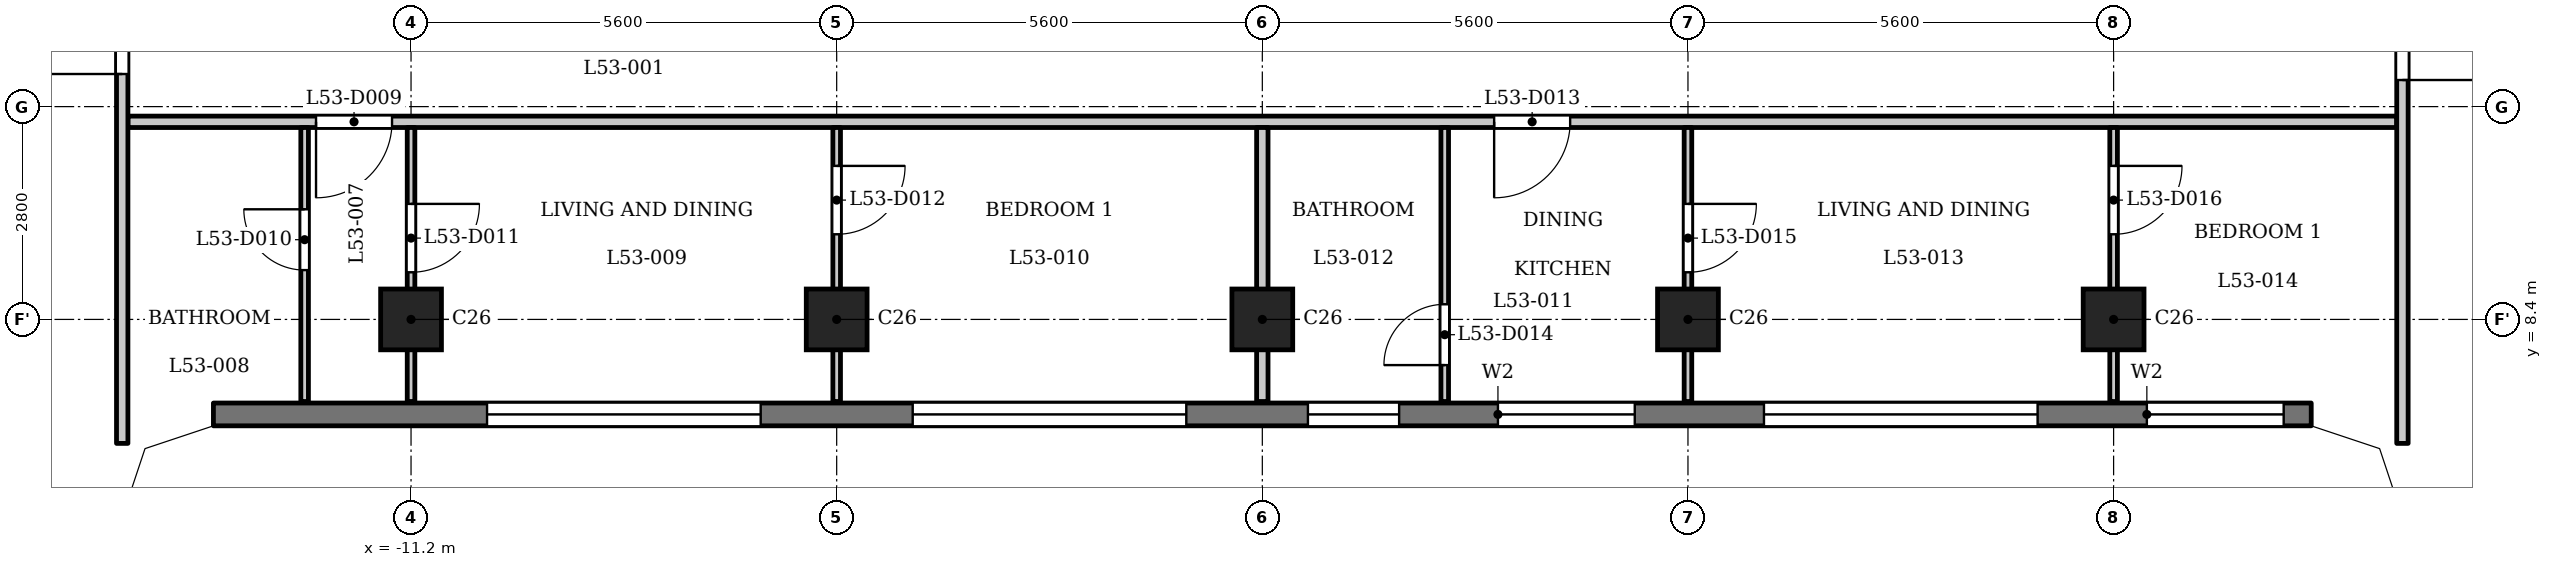
"""IFC4 building model, lengths in metres.
Left out: names, types, materials, properties, quantities, classifications, styles, units other than length and angle.
Written with IfcOpenShell. Run it as: python <this file> out.ifc"""

import sys

from ifc_helpers import new_model, si_unit, direction, frame, frame_2d, origin, origin_2d, place, context, subcontext, project, spatial, polyline, rectangle, outline, extrude, element, fill, save


model = new_model("IFC4")
c1 = context("Model", 3, precision=1e-05, world=origin(), true_north=direction((0.0, 1.0)))
c2 = subcontext(c1, "Body", "Model", "MODEL_VIEW")
j1 = project(units=[si_unit("LENGTHUNIT", "METRE"), si_unit("PLANEANGLEUNIT", "RADIAN")], contexts=[c1])
p1 = place(None, origin())
s1 = spatial("IfcSite", under=j1, at=p1, CompositionType="ELEMENT")
p2 = place(p1, origin())
s2 = spatial("IfcBuilding", under=s1, at=p2, CompositionType="ELEMENT")
p3 = place(p2, frame((0.0, 0.0, 206.4)))
s3 = spatial("IfcBuildingStorey", under=s2, at=p3, CompositionType="ELEMENT", Elevation=206.4)
for number, where, z_axis, x_axis in (
    (1, (-11.2, 8.4, 0.0), (0.0, 0.0, 1.0), (1.0, 0.0, 0.0)),
    (2, (-5.6, 8.4, 0.0), (0.0, 0.0, 1.0), (1.0, 0.0, 0.0)),
    (3, (0.0, 8.4, 0.0), (0.0, 0.0, 1.0), (1.0, 0.0, 0.0)),
    (4, (5.6, 8.4, 0.0), (0.0, 0.0, 1.0), (1.0, 0.0, 0.0)),
    (5, (11.2, 8.4, 0.0), (0.0, 0.0, 1.0), (1.0, 0.0, 0.0)),
):
    element("IfcColumn", number, at=place(p3, frame(where, z_axis=z_axis, x_axis=x_axis)), inside=s3, PredefinedType="COLUMN", context=c2, shape_type="SweptSolid", body=[
        extrude(rectangle(XDim=0.8, YDim=0.8, at=origin_2d()), origin(), (0.0, 0.0, 1.0), 3.5),
    ])
p4 = place(p3, frame((-13.8, 7.15, 0.0), z_axis=(0.0, 0.0, 1.0), x_axis=(1.0, 0.0, 0.0)))
e6 = element("IfcWall", 6, at=p4, inside=s3, PredefinedType="SOLIDWALL", context=c2, shape_type="SweptSolid", body=[
    extrude(rectangle(XDim=27.6, YDim=0.3, at=frame_2d((13.8, 0.0))), origin(), (0.0, 0.0, 1.0), 3.2),
])
p5 = place(p4, frame((3.6, 0.0, 1.2)))
e7 = element("IfcOpeningElement", 7, at=p5, cuts=e6, PredefinedType="OPENING", context=c2, shape_type="SweptSolid", body=[
    extrude(rectangle(XDim=3.6, YDim=0.95, at=frame_2d((1.8, 0.475))), frame((0.0, 0.16, 0.0), z_axis=(0.0, -1.0, 0.0), x_axis=(1.0, 0.0, 0.0)), (0.0, 0.0, 1.0), 0.32),
])
p6 = place(p4, frame((9.2, 0.0, 1.2)))
e8 = element("IfcOpeningElement", 8, at=p6, cuts=e6, PredefinedType="OPENING", context=c2, shape_type="SweptSolid", body=[
    extrude(rectangle(XDim=3.6, YDim=0.95, at=frame_2d((1.8, 0.475))), frame((0.0, 0.16, 0.0), z_axis=(0.0, -1.0, 0.0), x_axis=(1.0, 0.0, 0.0)), (0.0, 0.0, 1.0), 0.32),
])
p7 = place(p4, frame((14.4, 0.0, 0.6)))
e9 = element("IfcOpeningElement", 9, at=p7, cuts=e6, PredefinedType="OPENING", context=c2, shape_type="SweptSolid", body=[
    extrude(rectangle(XDim=1.2, YDim=1.55, at=frame_2d((0.6, 0.775))), frame((0.0, 0.16, 0.0), z_axis=(0.0, -1.0, 0.0), x_axis=(1.0, 0.0, 0.0)), (0.0, 0.0, 1.0), 0.32),
])
p8 = place(p4, frame((16.9, 0.0, 0.9)))
e10 = element("IfcOpeningElement", 10, at=p8, cuts=e6, PredefinedType="OPENING", context=c2, shape_type="SweptSolid", body=[
    extrude(rectangle(XDim=1.8, YDim=1.25, at=frame_2d((0.9, 0.625))), frame((0.0, 0.16, 0.0), z_axis=(0.0, -1.0, 0.0), x_axis=(1.0, 0.0, 0.0)), (0.0, 0.0, 1.0), 0.32),
])
p9 = place(p4, frame((20.4, 0.0, 1.2)))
e11 = element("IfcOpeningElement", 11, at=p9, cuts=e6, PredefinedType="OPENING", context=c2, shape_type="SweptSolid", body=[
    extrude(rectangle(XDim=3.6, YDim=0.95, at=frame_2d((1.8, 0.475))), frame((0.0, 0.16, 0.0), z_axis=(0.0, -1.0, 0.0), x_axis=(1.0, 0.0, 0.0)), (0.0, 0.0, 1.0), 0.32),
])
p10 = place(p4, frame((25.438, 0.0, 0.9)))
e12 = element("IfcOpeningElement", 12, at=p10, cuts=e6, PredefinedType="OPENING", context=c2, shape_type="SweptSolid", body=[
    extrude(rectangle(XDim=1.8, YDim=1.25, at=frame_2d((0.9, 0.625))), frame((0.0, 0.16, 0.0), z_axis=(0.0, -1.0, 0.0), x_axis=(1.0, 0.0, 0.0)), (0.0, 0.0, 1.0), 0.32),
])
p11 = place(p3, frame((-14.925, 11.0, 0.0), z_axis=(0.0, 0.0, 1.0), x_axis=(1.0, 0.0, 0.0)))
e13 = element("IfcWall", 13, at=p11, inside=s3, PredefinedType="PARTITIONING", context=c2, shape_type="SweptSolid", body=[
    extrude(rectangle(XDim=29.85, YDim=0.15, at=frame_2d((14.925, 0.0))), origin(), (0.0, 0.0, 1.0), 3.2),
])
p12 = place(p11, frame((2.475, 0.0, 0.0)))
e14 = element("IfcOpeningElement", 14, at=p12, cuts=e13, PredefinedType="OPENING", context=c2, shape_type="SweptSolid", body=[
    extrude(rectangle(XDim=1.0, YDim=2.1, at=frame_2d((0.5, 1.05))), frame((0.0, 0.085, 0.0), z_axis=(0.0, -1.0, 0.0), x_axis=(1.0, 0.0, 0.0)), (0.0, 0.0, 1.0), 0.17),
])
p13 = place(p11, frame((17.975, 0.0, 0.0)))
e15 = element("IfcOpeningElement", 15, at=p13, cuts=e13, PredefinedType="OPENING", context=c2, shape_type="SweptSolid", body=[
    extrude(rectangle(XDim=1.0, YDim=2.1, at=frame_2d((0.5, 1.05))), frame((0.0, 0.085, 0.0), z_axis=(0.0, -1.0, 0.0), x_axis=(1.0, 0.0, 0.0)), (0.0, 0.0, 1.0), 0.17),
])
p14 = place(p3, frame((-15.0, 6.769, 0.0), z_axis=(0.0, 0.0, 1.0), x_axis=(0.0, 1.0, 0.0)))
e16 = element("IfcWall", 16, at=p14, inside=s3, PredefinedType="PARTITIONING", context=c2, shape_type="SweptSolid", body=[
    extrude(rectangle(XDim=6.356, YDim=0.15, at=frame_2d((3.178, 0.0))), origin(), (0.0, 0.0, 1.0), 3.2),
])
p15 = place(p14, frame((4.86, 0.0, 0.0)))
e17 = element("IfcOpeningElement", 17, at=p15, cuts=e16, PredefinedType="OPENING", context=c2, shape_type="SweptSolid", body=[
    extrude(rectangle(XDim=1.0, YDim=2.1, at=frame_2d((0.5, 1.05))), frame((0.0, 0.085, 0.0), z_axis=(0.0, -1.0, 0.0), x_axis=(1.0, 0.0, 0.0)), (0.0, 0.0, 1.0), 0.17),
])
p16 = place(p3, frame((-12.6, 7.32, 0.0), z_axis=(0.0, 0.0, 1.0), x_axis=(0.0, 1.0, 0.0)))
e18 = element("IfcWall", 18, at=p16, inside=s3, PredefinedType="PARTITIONING", context=c2, shape_type="SweptSolid", body=[
    extrude(rectangle(XDim=3.605, YDim=0.1, at=frame_2d((1.802, 0.0))), origin(), (0.0, 0.0, 1.0), 3.2),
])
p17 = place(p16, frame((1.729, 0.0, 0.0)))
e19 = element("IfcOpeningElement", 19, at=p17, cuts=e18, PredefinedType="OPENING", context=c2, shape_type="SweptSolid", body=[
    extrude(rectangle(XDim=0.8, YDim=2.1, at=frame_2d((0.4, 1.05))), frame((0.0, 0.06, 0.0), z_axis=(0.0, -1.0, 0.0), x_axis=(1.0, 0.0, 0.0)), (0.0, 0.0, 1.0), 0.12),
])
p18 = place(p3, frame((-11.2, 7.32, 0.0), z_axis=(0.0, 0.0, 1.0), x_axis=(0.0, 1.0, 0.0)))
e20 = element("IfcWall", 20, at=p18, inside=s3, PredefinedType="PARTITIONING", context=c2, shape_type="SweptSolid", body=[
    extrude(rectangle(XDim=3.605, YDim=0.1, at=frame_2d((1.802, 0.0))), origin(), (0.0, 0.0, 1.0), 3.2),
])
p19 = place(p18, frame((1.7, 0.0, 0.0)))
e21 = element("IfcOpeningElement", 21, at=p19, cuts=e20, PredefinedType="OPENING", context=c2, shape_type="SweptSolid", body=[
    extrude(rectangle(XDim=0.9, YDim=2.1, at=frame_2d((0.45, 1.05))), frame((0.0, 0.06, 0.0), z_axis=(0.0, -1.0, 0.0), x_axis=(1.0, 0.0, 0.0)), (0.0, 0.0, 1.0), 0.12),
])
p20 = place(p3, frame((-5.6, 7.32, 0.0), z_axis=(0.0, 0.0, 1.0), x_axis=(0.0, 1.0, 0.0)))
e22 = element("IfcWall", 22, at=p20, inside=s3, PredefinedType="PARTITIONING", context=c2, shape_type="SweptSolid", body=[
    extrude(rectangle(XDim=3.605, YDim=0.1, at=frame_2d((1.802, 0.0))), origin(), (0.0, 0.0, 1.0), 3.2),
])
p21 = place(p20, frame((2.2, 0.0, 0.0)))
e23 = element("IfcOpeningElement", 23, at=p21, cuts=e22, PredefinedType="OPENING", context=c2, shape_type="SweptSolid", body=[
    extrude(rectangle(XDim=0.9, YDim=2.1, at=frame_2d((0.45, 1.05))), frame((0.0, 0.06, 0.0), z_axis=(0.0, -1.0, 0.0), x_axis=(1.0, 0.0, 0.0)), (0.0, 0.0, 1.0), 0.12),
])
p22 = place(p3, frame((0.0, 7.32, 0.0), z_axis=(0.0, 0.0, 1.0), x_axis=(0.0, 1.0, 0.0)))
e24 = element("IfcWall", 24, at=p22, inside=s3, PredefinedType="PARTITIONING", context=c2, shape_type="SweptSolid", body=[
    extrude(rectangle(XDim=3.605, YDim=0.15, at=frame_2d((1.802, 0.0))), origin(), (0.0, 0.0, 1.0), 3.2),
])
p23 = place(p3, frame((2.4, 7.32, 0.0), z_axis=(0.0, 0.0, 1.0), x_axis=(0.0, 1.0, 0.0)))
e25 = element("IfcWall", 25, at=p23, inside=s3, PredefinedType="PARTITIONING", context=c2, shape_type="SweptSolid", body=[
    extrude(rectangle(XDim=3.605, YDim=0.1, at=frame_2d((1.802, 0.0))), origin(), (0.0, 0.0, 1.0), 3.2),
])
p24 = place(p23, frame((0.479, 0.0, 0.0)))
e26 = element("IfcOpeningElement", 26, at=p24, cuts=e25, PredefinedType="OPENING", context=c2, shape_type="SweptSolid", body=[
    extrude(rectangle(XDim=0.8, YDim=2.1, at=frame_2d((0.4, 1.05))), frame((0.0, 0.06, 0.0), z_axis=(0.0, -1.0, 0.0), x_axis=(1.0, 0.0, 0.0)), (0.0, 0.0, 1.0), 0.12),
])
p25 = place(p3, frame((5.6, 7.32, 0.0), z_axis=(0.0, 0.0, 1.0), x_axis=(0.0, 1.0, 0.0)))
e27 = element("IfcWall", 27, at=p25, inside=s3, PredefinedType="PARTITIONING", context=c2, shape_type="SweptSolid", body=[
    extrude(rectangle(XDim=3.605, YDim=0.1, at=frame_2d((1.802, 0.0))), origin(), (0.0, 0.0, 1.0), 3.2),
])
p26 = place(p25, frame((1.7, 0.0, 0.0)))
e28 = element("IfcOpeningElement", 28, at=p26, cuts=e27, PredefinedType="OPENING", context=c2, shape_type="SweptSolid", body=[
    extrude(rectangle(XDim=0.9, YDim=2.1, at=frame_2d((0.45, 1.05))), frame((0.0, 0.06, 0.0), z_axis=(0.0, -1.0, 0.0), x_axis=(1.0, 0.0, 0.0)), (0.0, 0.0, 1.0), 0.12),
])
p27 = place(p3, frame((11.2, 7.32, 0.0), z_axis=(0.0, 0.0, 1.0), x_axis=(0.0, 1.0, 0.0)))
e29 = element("IfcWall", 29, at=p27, inside=s3, PredefinedType="PARTITIONING", context=c2, shape_type="SweptSolid", body=[
    extrude(rectangle(XDim=3.605, YDim=0.1, at=frame_2d((1.802, 0.0))), origin(), (0.0, 0.0, 1.0), 3.2),
])
p28 = place(p27, frame((2.2, 0.0, 0.0)))
e30 = element("IfcOpeningElement", 30, at=p28, cuts=e29, PredefinedType="OPENING", context=c2, shape_type="SweptSolid", body=[
    extrude(rectangle(XDim=0.9, YDim=2.1, at=frame_2d((0.45, 1.05))), frame((0.0, 0.06, 0.0), z_axis=(0.0, -1.0, 0.0), x_axis=(1.0, 0.0, 0.0)), (0.0, 0.0, 1.0), 0.12),
])
p29 = place(p3, frame((15.0, 6.769, 0.0), z_axis=(0.0, 0.0, 1.0), x_axis=(0.0, 1.0, 0.0)))
e31 = element("IfcWall", 31, at=p29, inside=s3, PredefinedType="PARTITIONING", context=c2, shape_type="SweptSolid", body=[
    extrude(rectangle(XDim=6.356, YDim=0.15, at=frame_2d((3.178, 0.0))), origin(), (0.0, 0.0, 1.0), 3.2),
])
p30 = place(p29, frame((4.781, 0.0, 0.0)))
e32 = element("IfcOpeningElement", 32, at=p30, cuts=e31, PredefinedType="OPENING", context=c2, shape_type="SweptSolid", body=[
    extrude(rectangle(XDim=1.0, YDim=2.1, at=frame_2d((0.5, 1.05))), frame((0.0, 0.085, 0.0), z_axis=(0.0, -1.0, 0.0), x_axis=(1.0, 0.0, 0.0)), (0.0, 0.0, 1.0), 0.17),
])
p31 = place(p3, origin())
e33 = element("IfcWall", 33, at=p31, inside=s3, PredefinedType="SOLIDWALL", context=c2, shape_type="SweptSolid", body=[
    extrude(outline(polyline([(-13.849, 7.3), (-14.937, 6.937), (-15.3, 5.849), (-15.3, 5.8), (-15.0, 5.8), (-14.7, 6.7), (-13.8, 7.0), (-13.8, 7.3), (-13.849, 7.3)])), origin(), (0.0, 0.0, 1.0), 3.2),
])
e34 = element("IfcWall", 34, at=p31, inside=s3, PredefinedType="SOLIDWALL", context=c2, shape_type="SweptSolid", body=[
    extrude(outline(polyline([(14.937, 6.937), (13.849, 7.3), (13.8, 7.3), (13.8, 7.0), (14.7, 6.7), (15.0, 5.8), (15.3, 5.8), (15.3, 5.849), (14.937, 6.937)])), origin(), (0.0, 0.0, 1.0), 3.2),
])
p32 = place(p15, origin())
e35 = element("IfcDoor", 35, at=p32, inside=s3, OperationType="SINGLE_SWING_RIGHT", PredefinedType="DOOR", context=c2, shape_type="SweptSolid", body=[
    extrude(rectangle(XDim=1.0, YDim=2.1, at=frame_2d((0.5, 1.05))), frame((0.0, 0.025, 0.0), z_axis=(0.0, -1.0, 0.0), x_axis=(1.0, 0.0, 0.0)), (0.0, 0.0, 1.0), 0.05),
])
fill(e17, e35)
p33 = place(p30, origin())
e36 = element("IfcDoor", 36, at=p33, inside=s3, OperationType="SINGLE_SWING_LEFT", PredefinedType="DOOR", context=c2, shape_type="SweptSolid", body=[
    extrude(rectangle(XDim=1.0, YDim=2.1, at=frame_2d((0.5, 1.05))), frame((0.0, 0.025, 0.0), z_axis=(0.0, -1.0, 0.0), x_axis=(1.0, 0.0, 0.0)), (0.0, 0.0, 1.0), 0.05),
])
fill(e32, e36)
p34 = place(p12, origin())
e37 = element("IfcDoor", 37, at=p34, inside=s3, OperationType="SINGLE_SWING_LEFT", PredefinedType="DOOR", context=c2, shape_type="SweptSolid", body=[
    extrude(rectangle(XDim=1.0, YDim=2.1, at=frame_2d((0.5, 1.05))), frame((0.0, 0.025, 0.0), z_axis=(0.0, -1.0, 0.0), x_axis=(1.0, 0.0, 0.0)), (0.0, 0.0, 1.0), 0.05),
])
fill(e14, e37)
p35 = place(p17, origin())
e38 = element("IfcDoor", 38, at=p35, inside=s3, OperationType="SINGLE_SWING_LEFT", PredefinedType="DOOR", context=c2, shape_type="SweptSolid", body=[
    extrude(rectangle(XDim=0.8, YDim=2.1, at=frame_2d((0.4, 1.05))), frame((0.0, 0.025, 0.0), z_axis=(0.0, -1.0, 0.0), x_axis=(1.0, 0.0, 0.0)), (0.0, 0.0, 1.0), 0.05),
])
fill(e19, e38)
p36 = place(p19, origin())
e39 = element("IfcDoor", 39, at=p36, inside=s3, OperationType="SINGLE_SWING_RIGHT", PredefinedType="DOOR", context=c2, shape_type="SweptSolid", body=[
    extrude(rectangle(XDim=0.9, YDim=2.1, at=frame_2d((0.45, 1.05))), frame((0.0, 0.025, 0.0), z_axis=(0.0, -1.0, 0.0), x_axis=(1.0, 0.0, 0.0)), (0.0, 0.0, 1.0), 0.05),
])
fill(e21, e39)
p37 = place(p21, origin())
e40 = element("IfcDoor", 40, at=p37, inside=s3, OperationType="SINGLE_SWING_RIGHT", PredefinedType="DOOR", context=c2, shape_type="SweptSolid", body=[
    extrude(rectangle(XDim=0.9, YDim=2.1, at=frame_2d((0.45, 1.05))), frame((0.0, 0.025, 0.0), z_axis=(0.0, -1.0, 0.0), x_axis=(1.0, 0.0, 0.0)), (0.0, 0.0, 1.0), 0.05),
])
fill(e23, e40)
p38 = place(p13, origin())
e41 = element("IfcDoor", 41, at=p38, inside=s3, OperationType="SINGLE_SWING_LEFT", PredefinedType="DOOR", context=c2, shape_type="SweptSolid", body=[
    extrude(rectangle(XDim=1.0, YDim=2.1, at=frame_2d((0.5, 1.05))), frame((0.0, 0.025, 0.0), z_axis=(0.0, -1.0, 0.0), x_axis=(1.0, 0.0, 0.0)), (0.0, 0.0, 1.0), 0.05),
])
fill(e15, e41)
p39 = place(p24, origin())
e42 = element("IfcDoor", 42, at=p39, inside=s3, OperationType="SINGLE_SWING_RIGHT", PredefinedType="DOOR", context=c2, shape_type="SweptSolid", body=[
    extrude(rectangle(XDim=0.8, YDim=2.1, at=frame_2d((0.4, 1.05))), frame((0.0, 0.025, 0.0), z_axis=(0.0, -1.0, 0.0), x_axis=(1.0, 0.0, 0.0)), (0.0, 0.0, 1.0), 0.05),
])
fill(e26, e42)
p40 = place(p26, origin())
e43 = element("IfcDoor", 43, at=p40, inside=s3, OperationType="SINGLE_SWING_RIGHT", PredefinedType="DOOR", context=c2, shape_type="SweptSolid", body=[
    extrude(rectangle(XDim=0.9, YDim=2.1, at=frame_2d((0.45, 1.05))), frame((0.0, 0.025, 0.0), z_axis=(0.0, -1.0, 0.0), x_axis=(1.0, 0.0, 0.0)), (0.0, 0.0, 1.0), 0.05),
])
fill(e28, e43)
p41 = place(p28, origin())
e44 = element("IfcDoor", 44, at=p41, inside=s3, OperationType="SINGLE_SWING_RIGHT", PredefinedType="DOOR", context=c2, shape_type="SweptSolid", body=[
    extrude(rectangle(XDim=0.9, YDim=2.1, at=frame_2d((0.45, 1.05))), frame((0.0, 0.025, 0.0), z_axis=(0.0, -1.0, 0.0), x_axis=(1.0, 0.0, 0.0)), (0.0, 0.0, 1.0), 0.05),
])
fill(e30, e44)
p42 = place(p5, origin())
e45 = element("IfcWindow", 45, at=p42, inside=s3, PartitioningType="SINGLE_PANEL", PredefinedType="WINDOW", context=c2, shape_type="SweptSolid", body=[
    extrude(rectangle(XDim=3.6, YDim=0.95, at=frame_2d((1.8, 0.475))), frame((0.0, 0.03, 0.0), z_axis=(0.0, -1.0, 0.0), x_axis=(1.0, 0.0, 0.0)), (0.0, 0.0, 1.0), 0.06),
])
fill(e7, e45)
p43 = place(p6, origin())
e46 = element("IfcWindow", 46, at=p43, inside=s3, PartitioningType="SINGLE_PANEL", PredefinedType="WINDOW", context=c2, shape_type="SweptSolid", body=[
    extrude(rectangle(XDim=3.6, YDim=0.95, at=frame_2d((1.8, 0.475))), frame((0.0, 0.03, 0.0), z_axis=(0.0, -1.0, 0.0), x_axis=(1.0, 0.0, 0.0)), (0.0, 0.0, 1.0), 0.06),
])
fill(e8, e46)
p44 = place(p7, origin())
e47 = element("IfcWindow", 47, at=p44, inside=s3, PartitioningType="SINGLE_PANEL", PredefinedType="WINDOW", context=c2, shape_type="SweptSolid", body=[
    extrude(rectangle(XDim=1.2, YDim=1.55, at=frame_2d((0.6, 0.775))), frame((0.0, 0.03, 0.0), z_axis=(0.0, -1.0, 0.0), x_axis=(1.0, 0.0, 0.0)), (0.0, 0.0, 1.0), 0.06),
])
fill(e9, e47)
p45 = place(p8, origin())
e48 = element("IfcWindow", 48, at=p45, inside=s3, PartitioningType="SINGLE_PANEL", PredefinedType="WINDOW", context=c2, shape_type="SweptSolid", body=[
    extrude(rectangle(XDim=1.8, YDim=1.25, at=frame_2d((0.9, 0.625))), frame((0.0, 0.03, 0.0), z_axis=(0.0, -1.0, 0.0), x_axis=(1.0, 0.0, 0.0)), (0.0, 0.0, 1.0), 0.06),
])
fill(e10, e48)
p46 = place(p9, origin())
e49 = element("IfcWindow", 49, at=p46, inside=s3, PartitioningType="SINGLE_PANEL", PredefinedType="WINDOW", context=c2, shape_type="SweptSolid", body=[
    extrude(rectangle(XDim=3.6, YDim=0.95, at=frame_2d((1.8, 0.475))), frame((0.0, 0.03, 0.0), z_axis=(0.0, -1.0, 0.0), x_axis=(1.0, 0.0, 0.0)), (0.0, 0.0, 1.0), 0.06),
])
fill(e11, e49)
p47 = place(p10, origin())
e50 = element("IfcWindow", 50, at=p47, inside=s3, PartitioningType="SINGLE_PANEL", PredefinedType="WINDOW", context=c2, shape_type="SweptSolid", body=[
    extrude(rectangle(XDim=1.8, YDim=1.25, at=frame_2d((0.9, 0.625))), frame((0.0, 0.03, 0.0), z_axis=(0.0, -1.0, 0.0), x_axis=(1.0, 0.0, 0.0)), (0.0, 0.0, 1.0), 0.06),
])
fill(e12, e50)
save(model, sys.argv[1])
